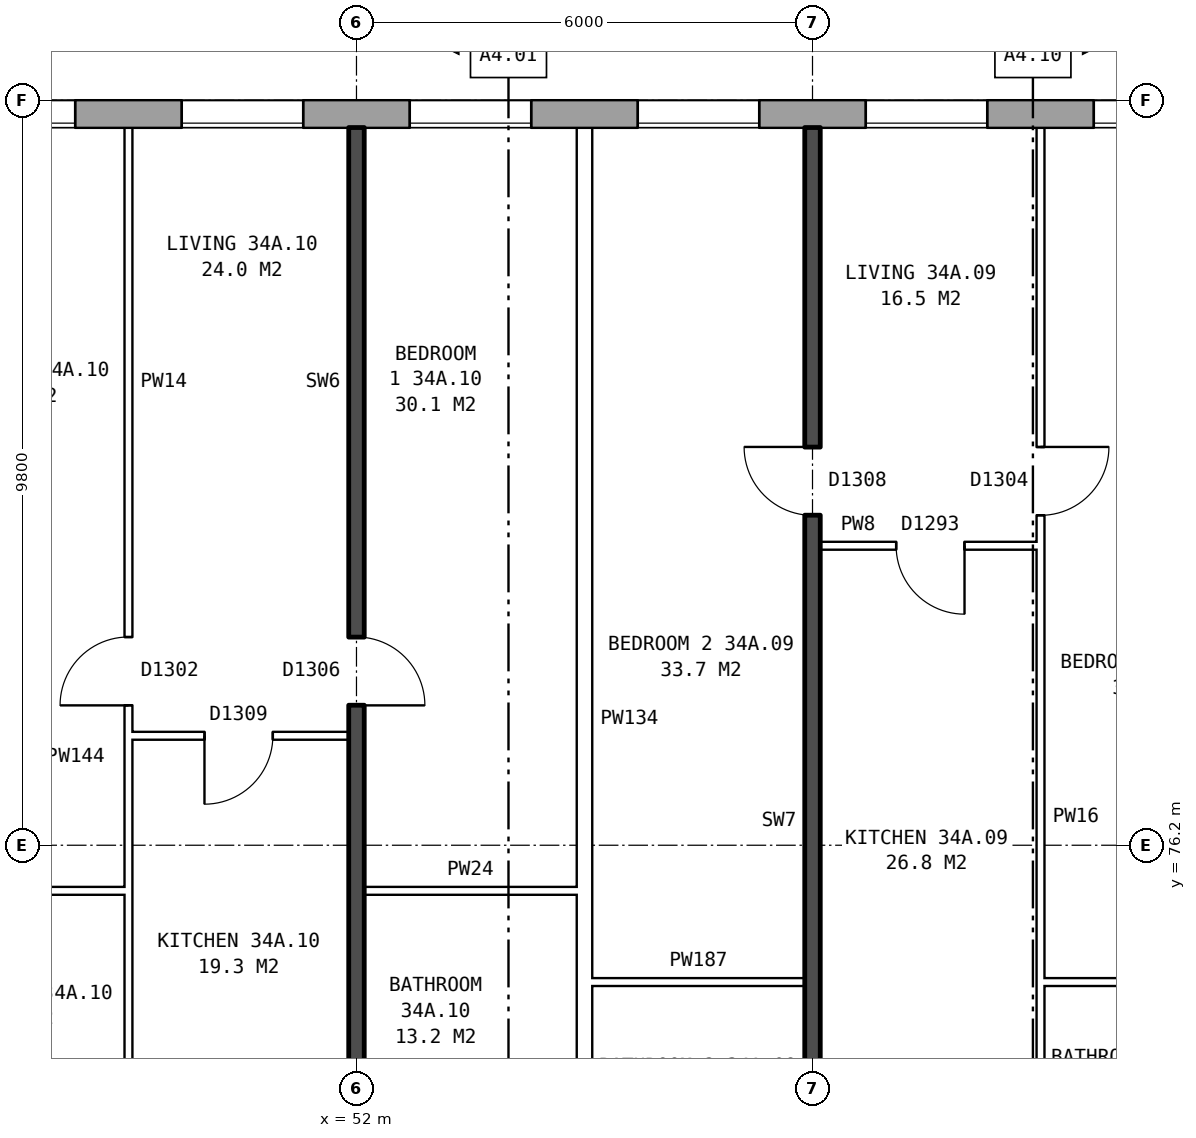
"""IFC4 building model, lengths in metres.
Left out: names, types, materials, properties, quantities, classifications, styles, units other than length and angle.
Written with IfcOpenShell. Run it as: python <this file> out.ifc"""

import sys

from ifc_helpers import new_model, si_unit, direction, frame, frame_2d, origin, place, context, subcontext, project, spatial, rectangle, extrude, element, fill, save


model = new_model("IFC4")
c1 = context("Model", 3, precision=1e-05, world=origin(), true_north=direction((0.0, 1.0)))
c2 = subcontext(c1, "Body", "Model", "MODEL_VIEW")
j1 = project(units=[si_unit("LENGTHUNIT", "METRE"), si_unit("PLANEANGLEUNIT", "RADIAN")], contexts=[c1])
p1 = place(None, origin())
s1 = spatial("IfcSite", under=j1, at=p1, CompositionType="ELEMENT")
p2 = place(p1, origin())
s2 = spatial("IfcBuilding", under=s1, at=p2, CompositionType="ELEMENT")
p3 = place(p2, frame((0.0, 0.0, 123.7)))
s3 = spatial("IfcBuildingStorey", under=s2, at=p3, CompositionType="ELEMENT", Elevation=123.7)
p4 = place(p3, frame((72.925, 85.82, 0.0), z_axis=(0.0, 0.0, 1.0), x_axis=(-1.0, 0.0, 0.0)))
e1 = element("IfcWall", 1, at=p4, inside=s3, PredefinedType="STANDARD", context=c2, shape_type="SweptSolid", body=[
    extrude(rectangle(XDim=43.101, YDim=0.36, at=frame_2d((21.55, 0.0))), origin(), (0.0, 0.0, 1.0), 2.85),
])
p5 = place(p4, frame((0.625, 0.0, 0.8)))
e2 = element("IfcOpeningElement", 2, at=p5, cuts=e1, PredefinedType="OPENING", context=c2, shape_type="SweptSolid", body=[
    extrude(rectangle(XDim=1.6, YDim=1.8, at=frame_2d((0.8, 0.9))), frame((0.0, 0.19, 0.0), z_axis=(0.0, -1.0, 0.0), x_axis=(1.0, 0.0, 0.0)), (0.0, 0.0, 1.0), 0.38),
])
p6 = place(p4, frame((4.125, 0.0, 0.8)))
e3 = element("IfcOpeningElement", 3, at=p6, cuts=e1, PredefinedType="OPENING", context=c2, shape_type="SweptSolid", body=[
    extrude(rectangle(XDim=0.6, YDim=0.9, at=frame_2d((0.3, 0.45))), frame((0.0, 0.19, 0.0), z_axis=(0.0, -1.0, 0.0), x_axis=(1.0, 0.0, 0.0)), (0.0, 0.0, 1.0), 0.38),
])
p7 = place(p4, frame((6.625, 0.0, 0.8)))
e4 = element("IfcOpeningElement", 4, at=p7, cuts=e1, PredefinedType="OPENING", context=c2, shape_type="SweptSolid", body=[
    extrude(rectangle(XDim=1.6, YDim=1.8, at=frame_2d((0.8, 0.9))), frame((0.0, 0.19, 0.0), z_axis=(0.0, -1.0, 0.0), x_axis=(1.0, 0.0, 0.0)), (0.0, 0.0, 1.0), 0.38),
])
p8 = place(p4, frame((9.625, 0.0, 0.8)))
e5 = element("IfcOpeningElement", 5, at=p8, cuts=e1, PredefinedType="OPENING", context=c2, shape_type="SweptSolid", body=[
    extrude(rectangle(XDim=1.6, YDim=1.8, at=frame_2d((0.8, 0.9))), frame((0.0, 0.19, 0.0), z_axis=(0.0, -1.0, 0.0), x_axis=(1.0, 0.0, 0.0)), (0.0, 0.0, 1.0), 0.38),
])
p9 = place(p4, frame((12.625, 0.0, 0.8)))
e6 = element("IfcOpeningElement", 6, at=p9, cuts=e1, PredefinedType="OPENING", context=c2, shape_type="SweptSolid", body=[
    extrude(rectangle(XDim=1.6, YDim=1.8, at=frame_2d((0.8, 0.9))), frame((0.0, 0.19, 0.0), z_axis=(0.0, -1.0, 0.0), x_axis=(1.0, 0.0, 0.0)), (0.0, 0.0, 1.0), 0.38),
])
p10 = place(p4, frame((15.625, 0.0, 0.8)))
e7 = element("IfcOpeningElement", 7, at=p10, cuts=e1, PredefinedType="OPENING", context=c2, shape_type="SweptSolid", body=[
    extrude(rectangle(XDim=1.6, YDim=1.8, at=frame_2d((0.8, 0.9))), frame((0.0, 0.19, 0.0), z_axis=(0.0, -1.0, 0.0), x_axis=(1.0, 0.0, 0.0)), (0.0, 0.0, 1.0), 0.38),
])
p11 = place(p4, frame((18.625, 0.0, 0.8)))
e8 = element("IfcOpeningElement", 8, at=p11, cuts=e1, PredefinedType="OPENING", context=c2, shape_type="SweptSolid", body=[
    extrude(rectangle(XDim=1.6, YDim=1.8, at=frame_2d((0.8, 0.9))), frame((0.0, 0.19, 0.0), z_axis=(0.0, -1.0, 0.0), x_axis=(1.0, 0.0, 0.0)), (0.0, 0.0, 1.0), 0.38),
])
p12 = place(p4, frame((21.625, 0.0, 0.8)))
e9 = element("IfcOpeningElement", 9, at=p12, cuts=e1, PredefinedType="OPENING", context=c2, shape_type="SweptSolid", body=[
    extrude(rectangle(XDim=1.6, YDim=1.8, at=frame_2d((0.8, 0.9))), frame((0.0, 0.19, 0.0), z_axis=(0.0, -1.0, 0.0), x_axis=(1.0, 0.0, 0.0)), (0.0, 0.0, 1.0), 0.38),
])
p13 = place(p4, frame((24.625, 0.0, 0.8)))
e10 = element("IfcOpeningElement", 10, at=p13, cuts=e1, PredefinedType="OPENING", context=c2, shape_type="SweptSolid", body=[
    extrude(rectangle(XDim=1.6, YDim=1.8, at=frame_2d((0.8, 0.9))), frame((0.0, 0.19, 0.0), z_axis=(0.0, -1.0, 0.0), x_axis=(1.0, 0.0, 0.0)), (0.0, 0.0, 1.0), 0.38),
])
p14 = place(p4, frame((27.625, 0.0, 0.8)))
e11 = element("IfcOpeningElement", 11, at=p14, cuts=e1, PredefinedType="OPENING", context=c2, shape_type="SweptSolid", body=[
    extrude(rectangle(XDim=1.6, YDim=1.8, at=frame_2d((0.8, 0.9))), frame((0.0, 0.19, 0.0), z_axis=(0.0, -1.0, 0.0), x_axis=(1.0, 0.0, 0.0)), (0.0, 0.0, 1.0), 0.38),
])
p15 = place(p4, frame((30.625, 0.0, 0.8)))
e12 = element("IfcOpeningElement", 12, at=p15, cuts=e1, PredefinedType="OPENING", context=c2, shape_type="SweptSolid", body=[
    extrude(rectangle(XDim=1.6, YDim=1.8, at=frame_2d((0.8, 0.9))), frame((0.0, 0.19, 0.0), z_axis=(0.0, -1.0, 0.0), x_axis=(1.0, 0.0, 0.0)), (0.0, 0.0, 1.0), 0.38),
])
p16 = place(p4, frame((33.625, 0.0, 0.8)))
e13 = element("IfcOpeningElement", 13, at=p16, cuts=e1, PredefinedType="OPENING", context=c2, shape_type="SweptSolid", body=[
    extrude(rectangle(XDim=1.6, YDim=1.8, at=frame_2d((0.8, 0.9))), frame((0.0, 0.19, 0.0), z_axis=(0.0, -1.0, 0.0), x_axis=(1.0, 0.0, 0.0)), (0.0, 0.0, 1.0), 0.38),
])
p17 = place(p4, frame((36.625, 0.0, 0.8)))
e14 = element("IfcOpeningElement", 14, at=p17, cuts=e1, PredefinedType="OPENING", context=c2, shape_type="SweptSolid", body=[
    extrude(rectangle(XDim=1.6, YDim=1.8, at=frame_2d((0.8, 0.9))), frame((0.0, 0.19, 0.0), z_axis=(0.0, -1.0, 0.0), x_axis=(1.0, 0.0, 0.0)), (0.0, 0.0, 1.0), 0.38),
])
p18 = place(p4, frame((40.125, 0.0, 1.7)))
e15 = element("IfcOpeningElement", 15, at=p18, cuts=e1, PredefinedType="OPENING", context=c2, shape_type="SweptSolid", body=[
    extrude(rectangle(XDim=0.6, YDim=0.9, at=frame_2d((0.3, 0.45))), frame((0.0, 0.19, 0.0), z_axis=(0.0, -1.0, 0.0), x_axis=(1.0, 0.0, 0.0)), (0.0, 0.0, 1.0), 0.38),
])
p19 = place(p4, frame((5.125, 0.0, 0.8)))
e16 = element("IfcOpeningElement", 16, at=p19, cuts=e1, PredefinedType="OPENING", context=c2, shape_type="SweptSolid", body=[
    extrude(rectangle(XDim=1.2, YDim=1.8, at=frame_2d((0.6, 0.9))), frame((0.0, 0.19, 0.0), z_axis=(0.0, -1.0, 0.0), x_axis=(1.0, 0.0, 0.0)), (0.0, 0.0, 1.0), 0.38),
])
p20 = place(p4, frame((41.125, 0.0, 0.8)))
e17 = element("IfcOpeningElement", 17, at=p20, cuts=e1, PredefinedType="OPENING", context=c2, shape_type="SweptSolid", body=[
    extrude(rectangle(XDim=1.6, YDim=1.8, at=frame_2d((0.8, 0.9))), frame((0.0, 0.19, 0.0), z_axis=(0.0, -1.0, 0.0), x_axis=(1.0, 0.0, 0.0)), (0.0, 0.0, 1.0), 0.38),
])
p21 = place(p3, frame((55.1, 74.4, 0.0), z_axis=(0.0, 0.0, 1.0), x_axis=(1.0, 0.0, 0.0)))
e18 = element("IfcWall", 18, at=p21, inside=s3, PredefinedType="PARTITIONING", context=c2, shape_type="SweptSolid", body=[
    extrude(rectangle(XDim=2.8, YDim=0.1, at=frame_2d((1.4, 0.0))), origin(), (0.0, 0.0, 1.0), 2.85),
])
p22 = place(p3, frame((61.0, 74.4, 0.0), z_axis=(0.0, 0.0, 1.0), x_axis=(1.0, 0.0, 0.0)))
e19 = element("IfcWall", 19, at=p22, inside=s3, PredefinedType="PARTITIONING", context=c2, shape_type="SweptSolid", body=[
    extrude(rectangle(XDim=2.64, YDim=0.1, at=frame_2d((1.32, 0.0))), origin(), (0.0, 0.0, 1.0), 2.85),
])
p23 = place(p3, frame((46.1, 75.6, 0.0), z_axis=(0.0, 0.0, 1.0), x_axis=(1.0, 0.0, 0.0)))
e20 = element("IfcWall", 20, at=p23, inside=s3, PredefinedType="PARTITIONING", context=c2, shape_type="SweptSolid", body=[
    extrude(rectangle(XDim=2.9, YDim=0.1, at=frame_2d((1.45, 0.0))), origin(), (0.0, 0.0, 1.0), 2.85),
])
p24 = place(p3, frame((52.1, 75.6, 0.0), z_axis=(0.0, 0.0, 1.0), x_axis=(1.0, 0.0, 0.0)))
e21 = element("IfcWall", 21, at=p24, inside=s3, PredefinedType="PARTITIONING", context=c2, shape_type="SweptSolid", body=[
    extrude(rectangle(XDim=2.8, YDim=0.1, at=frame_2d((1.4, 0.0))), origin(), (0.0, 0.0, 1.0), 2.85),
])
p25 = place(p3, frame((49.0, 77.64, 0.0), z_axis=(0.0, 0.0, 1.0), x_axis=(1.0, 0.0, 0.0)))
e22 = element("IfcWall", 22, at=p25, inside=s3, PredefinedType="PARTITIONING", context=c2, shape_type="SweptSolid", body=[
    extrude(rectangle(XDim=2.9, YDim=0.1, at=frame_2d((1.45, 0.0))), origin(), (0.0, 0.0, 1.0), 2.85),
])
p26 = place(p25, frame((1.0, 0.0, 0.0)))
e23 = element("IfcOpeningElement", 23, at=p26, cuts=e22, PredefinedType="OPENING", context=c2, shape_type="SweptSolid", body=[
    extrude(rectangle(XDim=0.9, YDim=2.1, at=frame_2d((0.45, 1.05))), frame((0.0, 0.06, 0.0), z_axis=(0.0, -1.0, 0.0), x_axis=(1.0, 0.0, 0.0)), (0.0, 0.0, 1.0), 0.12),
])
p27 = place(p3, frame((58.1, 80.14, 0.0), z_axis=(0.0, 0.0, 1.0), x_axis=(1.0, 0.0, 0.0)))
e24 = element("IfcWall", 24, at=p27, inside=s3, PredefinedType="PARTITIONING", context=c2, shape_type="SweptSolid", body=[
    extrude(rectangle(XDim=2.9, YDim=0.1, at=frame_2d((1.45, 0.0))), origin(), (0.0, 0.0, 1.0), 2.85),
])
p28 = place(p27, frame((1.0, 0.0, 0.0)))
e25 = element("IfcOpeningElement", 25, at=p28, cuts=e24, PredefinedType="OPENING", context=c2, shape_type="SweptSolid", body=[
    extrude(rectangle(XDim=0.9, YDim=2.1, at=frame_2d((0.45, 1.05))), frame((0.0, 0.06, 0.0), z_axis=(0.0, -1.0, 0.0), x_axis=(1.0, 0.0, 0.0)), (0.0, 0.0, 1.0), 0.12),
])
p29 = place(p3, frame((49.0, 71.3, 0.0), z_axis=(0.0, 0.0, 1.0), x_axis=(0.0, 1.0, 0.0)))
e26 = element("IfcWall", 26, at=p29, inside=s3, PredefinedType="PARTITIONING", context=c2, shape_type="SweptSolid", body=[
    extrude(rectangle(XDim=14.34, YDim=0.1, at=frame_2d((7.17, 0.0))), origin(), (0.0, 0.0, 1.0), 2.85),
])
p30 = place(p29, frame((6.74, 0.0, 0.0)))
e27 = element("IfcOpeningElement", 27, at=p30, cuts=e26, PredefinedType="OPENING", context=c2, shape_type="SweptSolid", body=[
    extrude(rectangle(XDim=0.9, YDim=2.1, at=frame_2d((0.45, 1.05))), frame((0.0, 0.06, 0.0), z_axis=(0.0, -1.0, 0.0), x_axis=(1.0, 0.0, 0.0)), (0.0, 0.0, 1.0), 0.12),
])
p31 = place(p29, frame((0.4, 0.0, 0.0)))
e28 = element("IfcOpeningElement", 28, at=p31, cuts=e26, PredefinedType="OPENING", context=c2, shape_type="SweptSolid", body=[
    extrude(rectangle(XDim=0.9, YDim=2.1, at=frame_2d((0.45, 1.05))), frame((0.0, 0.06, 0.0), z_axis=(0.0, -1.0, 0.0), x_axis=(1.0, 0.0, 0.0)), (0.0, 0.0, 1.0), 0.12),
])
p32 = place(p3, frame((52.0, 71.2, 0.0), z_axis=(0.0, 0.0, 1.0), x_axis=(0.0, 1.0, 0.0)))
e29 = element("IfcWall", 29, at=p32, inside=s3, PredefinedType="SOLIDWALL", context=c2, shape_type="SweptSolid", body=[
    extrude(rectangle(XDim=14.44, YDim=0.2, at=frame_2d((7.22, 0.0))), origin(), (0.0, 0.0, 1.0), 2.85),
])
p33 = place(p32, frame((6.84, 0.0, 0.0)))
e30 = element("IfcOpeningElement", 30, at=p33, cuts=e29, PredefinedType="OPENING", context=c2, shape_type="SweptSolid", body=[
    extrude(rectangle(XDim=0.9, YDim=2.1, at=frame_2d((0.45, 1.05))), frame((0.0, 0.11, 0.0), z_axis=(0.0, -1.0, 0.0), x_axis=(1.0, 0.0, 0.0)), (0.0, 0.0, 1.0), 0.22),
])
p34 = place(p32, frame((0.4, 0.0, 0.0)))
e31 = element("IfcOpeningElement", 31, at=p34, cuts=e29, PredefinedType="OPENING", context=c2, shape_type="SweptSolid", body=[
    extrude(rectangle(XDim=0.9, YDim=2.1, at=frame_2d((0.45, 1.05))), frame((0.0, 0.11, 0.0), z_axis=(0.0, -1.0, 0.0), x_axis=(1.0, 0.0, 0.0)), (0.0, 0.0, 1.0), 0.22),
])
p35 = place(p3, frame((55.0, 71.3, 0.0), z_axis=(0.0, 0.0, 1.0), x_axis=(0.0, 1.0, 0.0)))
e32 = element("IfcWall", 32, at=p35, inside=s3, PredefinedType="PARTITIONING", context=c2, shape_type="SweptSolid", body=[
    extrude(rectangle(XDim=14.34, YDim=0.2, at=frame_2d((7.17, 0.0))), origin(), (0.0, 0.0, 1.0), 2.85),
])
p36 = place(p3, frame((58.0, 71.2, 0.0), z_axis=(0.0, 0.0, 1.0), x_axis=(0.0, 1.0, 0.0)))
e33 = element("IfcWall", 33, at=p36, inside=s3, PredefinedType="SOLIDWALL", context=c2, shape_type="SweptSolid", body=[
    extrude(rectangle(XDim=14.44, YDim=0.2, at=frame_2d((7.22, 0.0))), origin(), (0.0, 0.0, 1.0), 2.85),
])
p37 = place(p36, frame((9.34, 0.0, 0.0)))
e34 = element("IfcOpeningElement", 34, at=p37, cuts=e33, PredefinedType="OPENING", context=c2, shape_type="SweptSolid", body=[
    extrude(rectangle(XDim=0.9, YDim=2.1, at=frame_2d((0.45, 1.05))), frame((0.0, 0.11, 0.0), z_axis=(0.0, -1.0, 0.0), x_axis=(1.0, 0.0, 0.0)), (0.0, 0.0, 1.0), 0.22),
])
p38 = place(p36, frame((0.4, 0.0, 0.0)))
e35 = element("IfcOpeningElement", 35, at=p38, cuts=e33, PredefinedType="OPENING", context=c2, shape_type="SweptSolid", body=[
    extrude(rectangle(XDim=0.9, YDim=2.1, at=frame_2d((0.45, 1.05))), frame((0.0, 0.11, 0.0), z_axis=(0.0, -1.0, 0.0), x_axis=(1.0, 0.0, 0.0)), (0.0, 0.0, 1.0), 0.22),
])
p39 = place(p3, frame((61.0, 71.3, 0.0), z_axis=(0.0, 0.0, 1.0), x_axis=(0.0, 1.0, 0.0)))
e36 = element("IfcWall", 36, at=p39, inside=s3, PredefinedType="PARTITIONING", context=c2, shape_type="SweptSolid", body=[
    extrude(rectangle(XDim=14.34, YDim=0.1, at=frame_2d((7.17, 0.0))), origin(), (0.0, 0.0, 1.0), 2.85),
])
p40 = place(p39, frame((9.24, 0.0, 0.0)))
e37 = element("IfcOpeningElement", 37, at=p40, cuts=e36, PredefinedType="OPENING", context=c2, shape_type="SweptSolid", body=[
    extrude(rectangle(XDim=0.9, YDim=2.1, at=frame_2d((0.45, 1.05))), frame((0.0, 0.06, 0.0), z_axis=(0.0, -1.0, 0.0), x_axis=(1.0, 0.0, 0.0)), (0.0, 0.0, 1.0), 0.12),
])
p41 = place(p39, frame((0.4, 0.0, 0.0)))
e38 = element("IfcOpeningElement", 38, at=p41, cuts=e36, PredefinedType="OPENING", context=c2, shape_type="SweptSolid", body=[
    extrude(rectangle(XDim=0.9, YDim=2.1, at=frame_2d((0.45, 1.05))), frame((0.0, 0.06, 0.0), z_axis=(0.0, -1.0, 0.0), x_axis=(1.0, 0.0, 0.0)), (0.0, 0.0, 1.0), 0.12),
])
p42 = place(p8, origin())
e39 = element("IfcWindow", 39, at=p42, inside=s3, PartitioningType="SINGLE_PANEL", PredefinedType="WINDOW", context=c2, shape_type="SweptSolid", body=[
    extrude(rectangle(XDim=1.6, YDim=1.8, at=frame_2d((0.8, 0.9))), frame((0.0, 0.15, 0.0), z_axis=(0.0, -1.0, 0.0), x_axis=(1.0, 0.0, 0.0)), (0.0, 0.0, 1.0), 0.06),
])
fill(e5, e39)
p43 = place(p9, origin())
e40 = element("IfcWindow", 40, at=p43, inside=s3, PartitioningType="SINGLE_PANEL", PredefinedType="WINDOW", context=c2, shape_type="SweptSolid", body=[
    extrude(rectangle(XDim=1.6, YDim=1.8, at=frame_2d((0.8, 0.9))), frame((0.0, 0.15, 0.0), z_axis=(0.0, -1.0, 0.0), x_axis=(1.0, 0.0, 0.0)), (0.0, 0.0, 1.0), 0.06),
])
fill(e6, e40)
p44 = place(p10, origin())
e41 = element("IfcWindow", 41, at=p44, inside=s3, PartitioningType="SINGLE_PANEL", PredefinedType="WINDOW", context=c2, shape_type="SweptSolid", body=[
    extrude(rectangle(XDim=1.6, YDim=1.8, at=frame_2d((0.8, 0.9))), frame((0.0, 0.15, 0.0), z_axis=(0.0, -1.0, 0.0), x_axis=(1.0, 0.0, 0.0)), (0.0, 0.0, 1.0), 0.06),
])
fill(e7, e41)
p45 = place(p11, origin())
e42 = element("IfcWindow", 42, at=p45, inside=s3, PartitioningType="SINGLE_PANEL", PredefinedType="WINDOW", context=c2, shape_type="SweptSolid", body=[
    extrude(rectangle(XDim=1.6, YDim=1.8, at=frame_2d((0.8, 0.9))), frame((0.0, 0.15, 0.0), z_axis=(0.0, -1.0, 0.0), x_axis=(1.0, 0.0, 0.0)), (0.0, 0.0, 1.0), 0.06),
])
fill(e8, e42)
p46 = place(p12, origin())
e43 = element("IfcWindow", 43, at=p46, inside=s3, PartitioningType="SINGLE_PANEL", PredefinedType="WINDOW", context=c2, shape_type="SweptSolid", body=[
    extrude(rectangle(XDim=1.6, YDim=1.8, at=frame_2d((0.8, 0.9))), frame((0.0, 0.15, 0.0), z_axis=(0.0, -1.0, 0.0), x_axis=(1.0, 0.0, 0.0)), (0.0, 0.0, 1.0), 0.06),
])
fill(e9, e43)
p47 = place(p13, origin())
e44 = element("IfcWindow", 44, at=p47, inside=s3, PartitioningType="SINGLE_PANEL", PredefinedType="WINDOW", context=c2, shape_type="SweptSolid", body=[
    extrude(rectangle(XDim=1.6, YDim=1.8, at=frame_2d((0.8, 0.9))), frame((0.0, 0.15, 0.0), z_axis=(0.0, -1.0, 0.0), x_axis=(1.0, 0.0, 0.0)), (0.0, 0.0, 1.0), 0.06),
])
fill(e10, e44)
p48 = place(p40, frame((0.9, 0.0, 0.0), z_axis=(0.0, 0.0, 1.0), x_axis=(-1.0, 0.0, 0.0)))
e45 = element("IfcDoor", 45, at=p48, inside=s3, OperationType="SINGLE_SWING_LEFT", PredefinedType="DOOR", context=c2, shape_type="SweptSolid", body=[
    extrude(rectangle(XDim=0.9, YDim=2.1, at=frame_2d((0.45, 1.05))), frame((0.0, 0.025, 0.0), z_axis=(0.0, -1.0, 0.0), x_axis=(1.0, 0.0, 0.0)), (0.0, 0.0, 1.0), 0.05),
])
fill(e37, e45)
p49 = place(p37, origin())
e46 = element("IfcDoor", 46, at=p49, inside=s3, OperationType="SINGLE_SWING_RIGHT", PredefinedType="DOOR", context=c2, shape_type="SweptSolid", body=[
    extrude(rectangle(XDim=0.9, YDim=2.1, at=frame_2d((0.45, 1.05))), frame((0.0, 0.025, 0.0), z_axis=(0.0, -1.0, 0.0), x_axis=(1.0, 0.0, 0.0)), (0.0, 0.0, 1.0), 0.05),
])
fill(e34, e46)
p50 = place(p28, frame((0.9, 0.0, 0.0), z_axis=(0.0, 0.0, 1.0), x_axis=(-1.0, 0.0, 0.0)))
e47 = element("IfcDoor", 47, at=p50, inside=s3, OperationType="SINGLE_SWING_LEFT", PredefinedType="DOOR", context=c2, shape_type="SweptSolid", body=[
    extrude(rectangle(XDim=0.9, YDim=2.1, at=frame_2d((0.45, 1.05))), frame((0.0, 0.025, 0.0), z_axis=(0.0, -1.0, 0.0), x_axis=(1.0, 0.0, 0.0)), (0.0, 0.0, 1.0), 0.05),
])
fill(e25, e47)
p51 = place(p33, frame((0.9, 0.0, 0.0), z_axis=(0.0, 0.0, 1.0), x_axis=(-1.0, 0.0, 0.0)))
e48 = element("IfcDoor", 48, at=p51, inside=s3, OperationType="SINGLE_SWING_RIGHT", PredefinedType="DOOR", context=c2, shape_type="SweptSolid", body=[
    extrude(rectangle(XDim=0.9, YDim=2.1, at=frame_2d((0.45, 1.05))), frame((0.0, 0.025, 0.0), z_axis=(0.0, -1.0, 0.0), x_axis=(1.0, 0.0, 0.0)), (0.0, 0.0, 1.0), 0.05),
])
fill(e30, e48)
p52 = place(p30, origin())
e49 = element("IfcDoor", 49, at=p52, inside=s3, OperationType="SINGLE_SWING_LEFT", PredefinedType="DOOR", context=c2, shape_type="SweptSolid", body=[
    extrude(rectangle(XDim=0.9, YDim=2.1, at=frame_2d((0.45, 1.05))), frame((0.0, 0.025, 0.0), z_axis=(0.0, -1.0, 0.0), x_axis=(1.0, 0.0, 0.0)), (0.0, 0.0, 1.0), 0.05),
])
fill(e27, e49)
p53 = place(p26, frame((0.9, 0.0, 0.0), z_axis=(0.0, 0.0, 1.0), x_axis=(-1.0, 0.0, 0.0)))
e50 = element("IfcDoor", 50, at=p53, inside=s3, OperationType="SINGLE_SWING_RIGHT", PredefinedType="DOOR", context=c2, shape_type="SweptSolid", body=[
    extrude(rectangle(XDim=0.9, YDim=2.1, at=frame_2d((0.45, 1.05))), frame((0.0, 0.025, 0.0), z_axis=(0.0, -1.0, 0.0), x_axis=(1.0, 0.0, 0.0)), (0.0, 0.0, 1.0), 0.05),
])
fill(e23, e50)
save(model, sys.argv[1])
